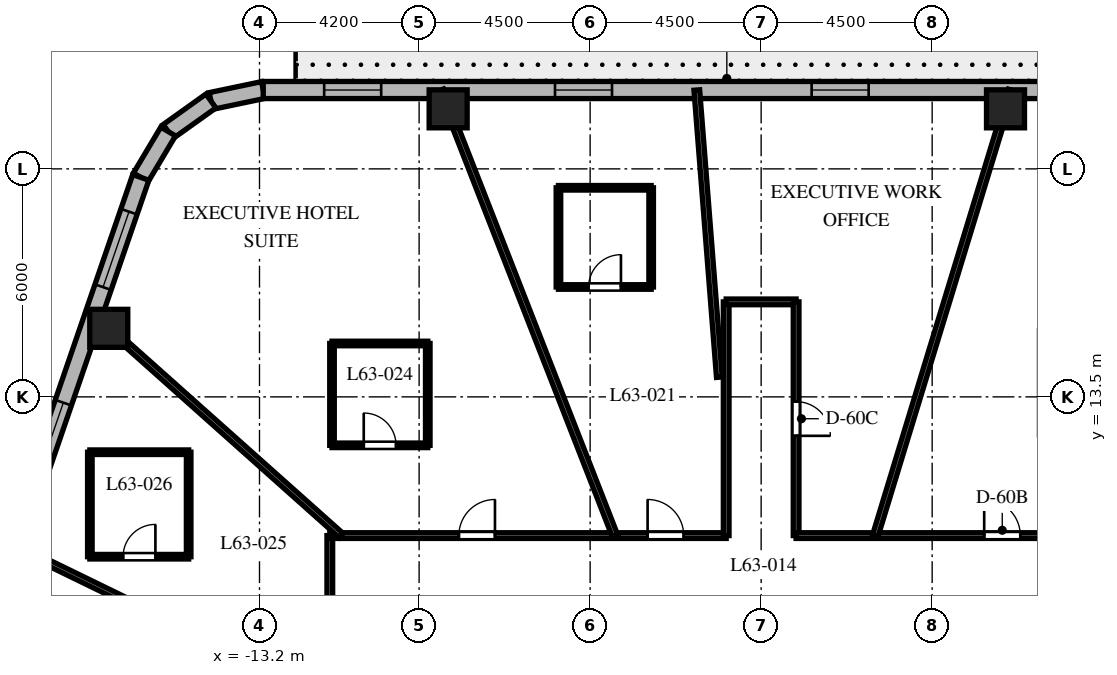
"""IFC4 building model, lengths in metres.
Left out: names, types, materials, properties, quantities, classifications, styles, units other than length and angle.
Written with IfcOpenShell. Run it as: python <this file> out.ifc"""

import sys

from ifc_helpers import new_model, si_unit, direction, frame, frame_2d, origin, origin_2d, place, context, subcontext, project, spatial, rectangle, extrude, element, fill, save


model = new_model("IFC4")
c1 = context("Model", 3, precision=1e-05, world=origin(), true_north=direction((0.0, 1.0)))
c2 = subcontext(c1, "Body", "Model", "MODEL_VIEW")
j1 = project(units=[si_unit("LENGTHUNIT", "METRE"), si_unit("PLANEANGLEUNIT", "RADIAN")], contexts=[c1])
p1 = place(None, origin())
s1 = spatial("IfcSite", under=j1, at=p1, CompositionType="ELEMENT")
p2 = place(p1, origin())
s2 = spatial("IfcBuilding", under=s1, at=p2, CompositionType="ELEMENT")
p3 = place(p2, frame((0.0, 0.0, 252.1)))
s3 = spatial("IfcBuildingStorey", under=s2, at=p3, CompositionType="ELEMENT", Elevation=252.1)
for number, where, z_axis, x_axis in (
    (1, (6.43, 21.08, 0.0), (0.0, 0.0, 1.0), (1.0, 0.0, 0.0)),
    (2, (-8.236, 21.08, 0.0), (0.0, 0.0, 1.0), (1.0, 0.0, 0.0)),
    (3, (-17.166, 15.304, 0.0), (0.0, 0.0, 1.0), (1.0, 0.0, 0.0)),
):
    element("IfcColumn", number, at=place(p3, frame(where, z_axis=z_axis, x_axis=x_axis)), inside=s3, PredefinedType="COLUMN", context=c2, shape_type="SweptSolid", body=[
        extrude(rectangle(XDim=1.0, YDim=1.0, at=origin_2d()), origin(), (0.0, 0.0, 1.0), 3.8),
    ])
p4 = place(p3, frame((-13.102, 21.575, 0.0), z_axis=(0.0, 0.0, 1.0), x_axis=(-0.978757421505, -0.205021730188, 0.0)))
e4 = element("IfcWall", 4, at=p4, inside=s3, PredefinedType="SOLIDWALL", context=c2, shape_type="SweptSolid", body=[
    extrude(rectangle(XDim=1.406, YDim=0.45, at=frame_2d((0.703, 0.0))), origin(), (0.0, 0.0, 1.0), 3.48),
])
p5 = place(p3, frame((-14.478, 21.287, 0.0), z_axis=(0.0, 0.0, 1.0), x_axis=(-0.813888518617, -0.58102106611, 0.0)))
e5 = element("IfcWall", 5, at=p5, inside=s3, PredefinedType="SOLIDWALL", context=c2, shape_type="SweptSolid", body=[
    extrude(rectangle(XDim=1.383, YDim=0.45, at=frame_2d((0.691, 0.0))), origin(), (0.0, 0.0, 1.0), 3.48),
])
p6 = place(p3, frame((-15.604, 20.483, 0.0), z_axis=(0.0, 0.0, 1.0), x_axis=(-0.512222149036, -0.858852996756, 0.0)))
e6 = element("IfcWall", 6, at=p6, inside=s3, PredefinedType="SOLIDWALL", context=c2, shape_type="SweptSolid", body=[
    extrude(rectangle(XDim=1.406, YDim=0.45, at=frame_2d((0.703, 0.0))), origin(), (0.0, 0.0, 1.0), 3.48),
])
p7 = place(p3, frame((11.298, 21.575, 0.0), z_axis=(0.0, 0.0, 1.0), x_axis=(-1.0, 0.0, 0.0)))
e7 = element("IfcWall", 7, at=p7, inside=s3, PredefinedType="SOLIDWALL", context=c2, shape_type="SweptSolid", body=[
    extrude(rectangle(XDim=24.399, YDim=0.45, at=frame_2d((12.2, 0.0))), origin(), (0.0, 0.0, 1.0), 3.48),
])
p8 = place(p7, frame((2.55, 0.0, 0.0)))
e8 = element("IfcOpeningElement", 8, at=p8, cuts=e7, PredefinedType="OPENING", context=c2, shape_type="SweptSolid", body=[
    extrude(rectangle(XDim=0.95, YDim=2.15, at=frame_2d((0.475, 1.075))), frame((0.0, 0.235, 0.0), z_axis=(0.0, -1.0, 0.0), x_axis=(1.0, 0.0, 0.0)), (0.0, 0.0, 1.0), 0.47),
])
p9 = place(p7, frame((8.469, 0.0, 0.8)))
e9 = element("IfcOpeningElement", 9, at=p9, cuts=e7, PredefinedType="OPENING", context=c2, shape_type="SweptSolid", body=[
    extrude(rectangle(XDim=1.5, YDim=1.8, at=frame_2d((0.75, 0.9))), frame((0.0, 0.235, 0.0), z_axis=(0.0, -1.0, 0.0), x_axis=(1.0, 0.0, 0.0)), (0.0, 0.0, 1.0), 0.47),
])
p10 = place(p7, frame((15.222, 0.0, 0.8)))
e10 = element("IfcOpeningElement", 10, at=p10, cuts=e7, PredefinedType="OPENING", context=c2, shape_type="SweptSolid", body=[
    extrude(rectangle(XDim=1.5, YDim=1.8, at=frame_2d((0.75, 0.9))), frame((0.0, 0.235, 0.0), z_axis=(0.0, -1.0, 0.0), x_axis=(1.0, 0.0, 0.0)), (0.0, 0.0, 1.0), 0.47),
])
p11 = place(p7, frame((21.296, 0.0, 0.8)))
e11 = element("IfcOpeningElement", 11, at=p11, cuts=e7, PredefinedType="OPENING", context=c2, shape_type="SweptSolid", body=[
    extrude(rectangle(XDim=1.5, YDim=1.8, at=frame_2d((0.75, 0.9))), frame((0.0, 0.235, 0.0), z_axis=(0.0, -1.0, 0.0), x_axis=(1.0, 0.0, 0.0)), (0.0, 0.0, 1.0), 0.47),
])
p12 = place(p3, frame((-16.324, 19.275, 0.0), z_axis=(0.0, 0.0, 1.0), x_axis=(-0.325083142304, -0.945685439557, 0.0)))
e12 = element("IfcWall", 12, at=p12, inside=s3, PredefinedType="SOLIDWALL", context=c2, shape_type="SweptSolid", body=[
    extrude(rectangle(XDim=20.224, YDim=0.45, at=frame_2d((10.112, 0.0))), origin(), (0.0, 0.0, 1.0), 3.48),
])
p13 = place(p12, frame((0.953, 0.0, 0.8)))
e13 = element("IfcOpeningElement", 13, at=p13, cuts=e12, PredefinedType="OPENING", context=c2, shape_type="SweptSolid", body=[
    extrude(rectangle(XDim=2.1, YDim=1.85, at=frame_2d((1.05, 0.925))), frame((0.0, 0.235, 0.0), z_axis=(0.0, -1.0, 0.0), x_axis=(1.0, 0.0, 0.0)), (0.0, 0.0, 1.0), 0.47),
])
p14 = place(p12, frame((6.268, 0.0, 0.8)))
e14 = element("IfcOpeningElement", 14, at=p14, cuts=e12, PredefinedType="OPENING", context=c2, shape_type="SweptSolid", body=[
    extrude(rectangle(XDim=2.1, YDim=1.85, at=frame_2d((1.05, 0.925))), frame((0.0, 0.235, 0.0), z_axis=(0.0, -1.0, 0.0), x_axis=(1.0, 0.0, 0.0)), (0.0, 0.0, 1.0), 0.47),
])
p15 = place(p12, frame((11.95, 0.0, 0.8)))
e15 = element("IfcOpeningElement", 15, at=p15, cuts=e12, PredefinedType="OPENING", context=c2, shape_type="SweptSolid", body=[
    extrude(rectangle(XDim=2.1, YDim=1.85, at=frame_2d((1.05, 0.925))), frame((0.0, 0.235, 0.0), z_axis=(0.0, -1.0, 0.0), x_axis=(1.0, 0.0, 0.0)), (0.0, 0.0, 1.0), 0.47),
])
p16 = place(p12, frame((17.118, 0.0, 0.8)))
e16 = element("IfcOpeningElement", 16, at=p16, cuts=e12, PredefinedType="OPENING", context=c2, shape_type="SweptSolid", body=[
    extrude(rectangle(XDim=2.1, YDim=1.85, at=frame_2d((1.05, 0.925))), frame((0.0, 0.235, 0.0), z_axis=(0.0, -1.0, 0.0), x_axis=(1.0, 0.0, 0.0)), (0.0, 0.0, 1.0), 0.47),
])
p17 = place(p3, frame((-11.35, 4.4, 0.0), z_axis=(0.0, 0.0, 1.0), x_axis=(0.0, 1.0, 0.0)))
e17 = element("IfcWall", 17, at=p17, inside=s3, PredefinedType="PARTITIONING", context=c2, shape_type="SweptSolid", body=[
    extrude(rectangle(XDim=5.45, YDim=0.15, at=frame_2d((2.725, 0.0))), origin(), (0.0, 0.0, 1.0), 2.97),
])
p18 = place(p17, frame((2.694, 0.0, 0.0)))
e18 = element("IfcOpeningElement", 18, at=p18, cuts=e17, PredefinedType="OPENING", context=c2, shape_type="SweptSolid", body=[
    extrude(rectangle(XDim=0.95, YDim=2.03, at=frame_2d((0.475, 1.015))), frame((0.0, 0.085, 0.0), z_axis=(0.0, -1.0, 0.0), x_axis=(1.0, 0.0, 0.0)), (0.0, 0.0, 1.0), 0.17),
])
p19 = place(p3, frame((-11.35, 9.85, 0.0), z_axis=(0.0, 0.0, 1.0), x_axis=(1.0, 0.0, 0.0)))
e19 = element("IfcWall", 19, at=p19, inside=s3, PredefinedType="PARTITIONING", context=c2, shape_type="SweptSolid", body=[
    extrude(rectangle(XDim=10.43, YDim=0.15, at=frame_2d((5.215, 0.0))), origin(), (0.0, 0.0, 1.0), 2.97),
])
p20 = place(p19, frame((8.362, 0.0, 0.0)))
e20 = element("IfcOpeningElement", 20, at=p20, cuts=e19, PredefinedType="OPENING", context=c2, shape_type="SweptSolid", body=[
    extrude(rectangle(XDim=0.95, YDim=2.03, at=frame_2d((0.475, 1.015))), frame((0.0, 0.085, 0.0), z_axis=(0.0, -1.0, 0.0), x_axis=(1.0, 0.0, 0.0)), (0.0, 0.0, 1.0), 0.17),
])
p21 = place(p19, frame((3.396, 0.0, 0.0)))
e21 = element("IfcOpeningElement", 21, at=p21, cuts=e19, PredefinedType="OPENING", context=c2, shape_type="SweptSolid", body=[
    extrude(rectangle(XDim=0.95, YDim=2.03, at=frame_2d((0.475, 1.015))), frame((0.0, 0.085, 0.0), z_axis=(0.0, -1.0, 0.0), x_axis=(1.0, 0.0, 0.0)), (0.0, 0.0, 1.0), 0.17),
])
p22 = place(p3, frame((-0.92, 9.85, 0.0), z_axis=(0.0, 0.0, 1.0), x_axis=(0.0, 1.0, 0.0)))
e22 = element("IfcWall", 22, at=p22, inside=s3, PredefinedType="PARTITIONING", context=c2, shape_type="SweptSolid", body=[
    extrude(rectangle(XDim=6.15, YDim=0.15, at=frame_2d((3.075, 0.0))), origin(), (0.0, 0.0, 1.0), 3.006),
])
p23 = place(p3, frame((-0.92, 16.0, 0.0), z_axis=(0.0, 0.0, 1.0), x_axis=(1.0, 0.0, 0.0)))
e23 = element("IfcWall", 23, at=p23, inside=s3, PredefinedType="PARTITIONING", context=c2, shape_type="SweptSolid", body=[
    extrude(rectangle(XDim=1.84, YDim=0.15, at=frame_2d((0.92, 0.0))), origin(), (0.0, 0.0, 1.0), 3.48),
])
p24 = place(p3, frame((0.92, 16.0, 0.0), z_axis=(0.0, 0.0, 1.0), x_axis=(0.0, -1.0, 0.0)))
e24 = element("IfcWall", 24, at=p24, inside=s3, PredefinedType="PARTITIONING", context=c2, shape_type="SweptSolid", body=[
    extrude(rectangle(XDim=6.15, YDim=0.15, at=frame_2d((3.075, 0.0))), origin(), (0.0, 0.0, 1.0), 3.006),
])
p25 = place(p24, frame((2.625, 0.0, 0.0)))
e25 = element("IfcOpeningElement", 25, at=p25, cuts=e24, PredefinedType="OPENING", context=c2, shape_type="SweptSolid", body=[
    extrude(rectangle(XDim=0.9, YDim=2.03, at=frame_2d((0.45, 1.015))), frame((0.0, 0.085, 0.0), z_axis=(0.0, -1.0, 0.0), x_axis=(1.0, 0.0, 0.0)), (0.0, 0.0, 1.0), 0.17),
])
p26 = place(p3, frame((0.92, 9.85, 0.0), z_axis=(0.0, 0.0, 1.0), x_axis=(1.0, 0.0, 0.0)))
e26 = element("IfcWall", 26, at=p26, inside=s3, PredefinedType="PARTITIONING", context=c2, shape_type="SweptSolid", body=[
    extrude(rectangle(XDim=10.43, YDim=0.15, at=frame_2d((5.215, 0.0))), origin(), (0.0, 0.0, 1.0), 2.97),
])
p27 = place(p26, frame((4.949, 0.0, 0.0)))
e27 = element("IfcOpeningElement", 27, at=p27, cuts=e26, PredefinedType="OPENING", context=c2, shape_type="SweptSolid", body=[
    extrude(rectangle(XDim=0.95, YDim=2.03, at=frame_2d((0.475, 1.015))), frame((0.0, 0.085, 0.0), z_axis=(0.0, -1.0, 0.0), x_axis=(1.0, 0.0, 0.0)), (0.0, 0.0, 1.0), 0.17),
])
p28 = place(p3, frame((3.004, 9.85, 0.0), z_axis=(0.0, 0.0, 1.0), x_axis=(0.291775760688, 0.956486751333, 0.0)))
e28 = element("IfcWall", 28, at=p28, inside=s3, PredefinedType="PARTITIONING", context=c2, shape_type="SweptSolid", body=[
    extrude(rectangle(XDim=12.258, YDim=0.15, at=frame_2d((6.129, 0.0))), origin(), (0.0, 0.0, 1.0), 2.72),
])
p29 = place(p3, frame((-1.1, 14.018, 0.0), z_axis=(0.0, 0.0, 1.0), x_axis=(-0.078228275349, 0.996935472804, 0.0)))
e29 = element("IfcWall", 29, at=p29, inside=s3, PredefinedType="PARTITIONING", context=c2, shape_type="SweptSolid", body=[
    extrude(rectangle(XDim=7.581, YDim=0.15, at=frame_2d((3.79, 0.0))), origin(), (0.0, 0.0, 1.0), 2.72),
])
p30 = place(p3, frame((-3.848, 9.85, 0.0), z_axis=(0.0, 0.0, 1.0), x_axis=(-0.363921778212, 0.931429513889, 0.0)))
e30 = element("IfcWall", 30, at=p30, inside=s3, PredefinedType="PARTITIONING", context=c2, shape_type="SweptSolid", body=[
    extrude(rectangle(XDim=12.588, YDim=0.15, at=frame_2d((6.294, 0.0))), origin(), (0.0, 0.0, 1.0), 2.72),
])
p31 = place(p3, frame((-11.048, 9.85, 0.0), z_axis=(0.0, 0.0, 1.0), x_axis=(-0.746444434655, 0.665447748492, 0.0)))
e31 = element("IfcWall", 31, at=p31, inside=s3, PredefinedType="PARTITIONING", context=c2, shape_type="SweptSolid", body=[
    extrude(rectangle(XDim=8.732, YDim=0.15, at=frame_2d((4.366, 0.0))), origin(), (0.0, 0.0, 1.0), 2.72),
])
p32 = place(p3, frame((-11.35, 5.528, 0.0), z_axis=(0.0, 0.0, 1.0), x_axis=(-0.899038669565, 0.437869239188, 0.0)))
e32 = element("IfcWall", 32, at=p32, inside=s3, PredefinedType="PARTITIONING", context=c2, shape_type="SweptSolid", body=[
    extrude(rectangle(XDim=9.242, YDim=0.15, at=frame_2d((4.621, 0.0))), origin(), (0.0, 0.0, 1.0), 2.72),
])
p33 = place(p3, frame((-5.334, 16.392, 0.0), z_axis=(0.0, 0.0, 1.0), x_axis=(1.0, 0.0, 0.0)))
e33 = element("IfcWall", 33, at=p33, inside=s3, PredefinedType="PARTITIONING", context=c2, shape_type="SweptSolid", body=[
    extrude(rectangle(XDim=2.44, YDim=0.12, at=frame_2d((1.22, 0.0))), origin(), (0.0, 0.0, 1.0), 3.48),
])
p34 = place(p33, frame((0.795, 0.0, 0.0)))
e34 = element("IfcOpeningElement", 34, at=p34, cuts=e33, PredefinedType="OPENING", context=c2, shape_type="SweptSolid", body=[
    extrude(rectangle(XDim=0.85, YDim=2.03, at=frame_2d((0.425, 1.015))), frame((0.0, 0.07, 0.0), z_axis=(0.0, -1.0, 0.0), x_axis=(1.0, 0.0, 0.0)), (0.0, 0.0, 1.0), 0.14),
])
p35 = place(p3, frame((-2.894, 16.392, 0.0), z_axis=(0.0, 0.0, 1.0), x_axis=(0.0, 1.0, 0.0)))
e35 = element("IfcWall", 35, at=p35, inside=s3, PredefinedType="PARTITIONING", context=c2, shape_type="SweptSolid", body=[
    extrude(rectangle(XDim=2.61, YDim=0.12, at=frame_2d((1.305, 0.0))), origin(), (0.0, 0.0, 1.0), 2.92),
])
p36 = place(p3, frame((-2.894, 19.002, 0.0), z_axis=(0.0, 0.0, 1.0), x_axis=(-1.0, 0.0, 0.0)))
e36 = element("IfcWall", 36, at=p36, inside=s3, PredefinedType="PARTITIONING", context=c2, shape_type="SweptSolid", body=[
    extrude(rectangle(XDim=2.44, YDim=0.12, at=frame_2d((1.22, 0.0))), origin(), (0.0, 0.0, 1.0), 3.48),
])
p37 = place(p3, frame((-5.334, 19.002, 0.0), z_axis=(0.0, 0.0, 1.0), x_axis=(0.0, -1.0, 0.0)))
e37 = element("IfcWall", 37, at=p37, inside=s3, PredefinedType="PARTITIONING", context=c2, shape_type="SweptSolid", body=[
    extrude(rectangle(XDim=2.61, YDim=0.12, at=frame_2d((1.305, 0.0))), origin(), (0.0, 0.0, 1.0), 2.92),
])
p38 = place(p3, frame((-11.292, 12.225, 0.0), z_axis=(0.0, 0.0, 1.0), x_axis=(1.0, 0.0, 0.0)))
e38 = element("IfcWall", 38, at=p38, inside=s3, PredefinedType="PARTITIONING", context=c2, shape_type="SweptSolid", body=[
    extrude(rectangle(XDim=2.52, YDim=0.12, at=frame_2d((1.26, 0.0))), origin(), (0.0, 0.0, 1.0), 2.97),
])
p39 = place(p38, frame((0.835, 0.0, 0.0)))
e39 = element("IfcOpeningElement", 39, at=p39, cuts=e38, PredefinedType="OPENING", context=c2, shape_type="SweptSolid", body=[
    extrude(rectangle(XDim=0.85, YDim=2.03, at=frame_2d((0.425, 1.015))), frame((0.0, 0.07, 0.0), z_axis=(0.0, -1.0, 0.0), x_axis=(1.0, 0.0, 0.0)), (0.0, 0.0, 1.0), 0.14),
])
p40 = place(p3, frame((-8.772, 12.225, 0.0), z_axis=(0.0, 0.0, 1.0), x_axis=(0.0, 1.0, 0.0)))
e40 = element("IfcWall", 40, at=p40, inside=s3, PredefinedType="PARTITIONING", context=c2, shape_type="SweptSolid", body=[
    extrude(rectangle(XDim=2.68, YDim=0.12, at=frame_2d((1.34, 0.0))), origin(), (0.0, 0.0, 1.0), 2.97),
])
p41 = place(p3, frame((-8.772, 14.905, 0.0), z_axis=(0.0, 0.0, 1.0), x_axis=(-1.0, 0.0, 0.0)))
e41 = element("IfcWall", 41, at=p41, inside=s3, PredefinedType="PARTITIONING", context=c2, shape_type="SweptSolid", body=[
    extrude(rectangle(XDim=2.52, YDim=0.12, at=frame_2d((1.26, 0.0))), origin(), (0.0, 0.0, 1.0), 3.006),
])
p42 = place(p3, frame((-11.292, 14.905, 0.0), z_axis=(0.0, 0.0, 1.0), x_axis=(0.0, -1.0, 0.0)))
e42 = element("IfcWall", 42, at=p42, inside=s3, PredefinedType="PARTITIONING", context=c2, shape_type="SweptSolid", body=[
    extrude(rectangle(XDim=2.68, YDim=0.12, at=frame_2d((1.34, 0.0))), origin(), (0.0, 0.0, 1.0), 3.006),
])
p43 = place(p3, frame((-17.664, 9.294, 0.0), z_axis=(0.0, 0.0, 1.0), x_axis=(1.0, 0.0, 0.0)))
e43 = element("IfcWall", 43, at=p43, inside=s3, PredefinedType="PARTITIONING", context=c2, shape_type="SweptSolid", body=[
    extrude(rectangle(XDim=2.6, YDim=0.12, at=frame_2d((1.3, 0.0))), origin(), (0.0, 0.0, 1.0), 3.052),
])
p44 = place(p43, frame((0.875, 0.0, 0.0)))
e44 = element("IfcOpeningElement", 44, at=p44, cuts=e43, PredefinedType="OPENING", context=c2, shape_type="SweptSolid", body=[
    extrude(rectangle(XDim=0.85, YDim=2.03, at=frame_2d((0.425, 1.015))), frame((0.0, 0.07, 0.0), z_axis=(0.0, -1.0, 0.0), x_axis=(1.0, 0.0, 0.0)), (0.0, 0.0, 1.0), 0.14),
])
p45 = place(p3, frame((-15.064, 9.294, 0.0), z_axis=(0.0, 0.0, 1.0), x_axis=(0.0, 1.0, 0.0)))
e45 = element("IfcWall", 45, at=p45, inside=s3, PredefinedType="PARTITIONING", context=c2, shape_type="SweptSolid", body=[
    extrude(rectangle(XDim=2.75, YDim=0.12, at=frame_2d((1.375, 0.0))), origin(), (0.0, 0.0, 1.0), 3.052),
])
p46 = place(p3, frame((-15.064, 12.044, 0.0), z_axis=(0.0, 0.0, 1.0), x_axis=(-1.0, 0.0, 0.0)))
e46 = element("IfcWall", 46, at=p46, inside=s3, PredefinedType="PARTITIONING", context=c2, shape_type="SweptSolid", body=[
    extrude(rectangle(XDim=2.6, YDim=0.12, at=frame_2d((1.3, 0.0))), origin(), (0.0, 0.0, 1.0), 3.48),
])
p47 = place(p3, frame((-17.664, 12.044, 0.0), z_axis=(0.0, 0.0, 1.0), x_axis=(0.0, -1.0, 0.0)))
e47 = element("IfcWall", 47, at=p47, inside=s3, PredefinedType="PARTITIONING", context=c2, shape_type="SweptSolid", body=[
    extrude(rectangle(XDim=2.75, YDim=0.12, at=frame_2d((1.375, 0.0))), origin(), (0.0, 0.0, 1.0), 3.48),
])
p48 = place(p9, origin())
e48 = element("IfcWindow", 48, at=p48, inside=s3, PartitioningType="SINGLE_PANEL", PredefinedType="WINDOW", context=c2, shape_type="SweptSolid", body=[
    extrude(rectangle(XDim=1.5, YDim=1.8, at=frame_2d((0.75, 0.9))), frame((0.0, 0.03, 0.0), z_axis=(0.0, -1.0, 0.0), x_axis=(1.0, 0.0, 0.0)), (0.0, 0.0, 1.0), 0.06),
])
fill(e9, e48)
p49 = place(p10, origin())
e49 = element("IfcWindow", 49, at=p49, inside=s3, PartitioningType="SINGLE_PANEL", PredefinedType="WINDOW", context=c2, shape_type="SweptSolid", body=[
    extrude(rectangle(XDim=1.5, YDim=1.8, at=frame_2d((0.75, 0.9))), frame((0.0, 0.03, 0.0), z_axis=(0.0, -1.0, 0.0), x_axis=(1.0, 0.0, 0.0)), (0.0, 0.0, 1.0), 0.06),
])
fill(e10, e49)
p50 = place(p11, origin())
e50 = element("IfcWindow", 50, at=p50, inside=s3, PartitioningType="SINGLE_PANEL", PredefinedType="WINDOW", context=c2, shape_type="SweptSolid", body=[
    extrude(rectangle(XDim=1.5, YDim=1.8, at=frame_2d((0.75, 0.9))), frame((0.0, 0.03, 0.0), z_axis=(0.0, -1.0, 0.0), x_axis=(1.0, 0.0, 0.0)), (0.0, 0.0, 1.0), 0.06),
])
fill(e11, e50)
p51 = place(p13, origin())
e51 = element("IfcWindow", 51, at=p51, inside=s3, PartitioningType="SINGLE_PANEL", PredefinedType="WINDOW", context=c2, shape_type="SweptSolid", body=[
    extrude(rectangle(XDim=2.1, YDim=1.85, at=frame_2d((1.05, 0.925))), frame((0.0, 0.03, 0.0), z_axis=(0.0, -1.0, 0.0), x_axis=(1.0, 0.0, 0.0)), (0.0, 0.0, 1.0), 0.06),
])
fill(e13, e51)
p52 = place(p14, origin())
e52 = element("IfcWindow", 52, at=p52, inside=s3, PartitioningType="SINGLE_PANEL", PredefinedType="WINDOW", context=c2, shape_type="SweptSolid", body=[
    extrude(rectangle(XDim=2.1, YDim=1.85, at=frame_2d((1.05, 0.925))), frame((0.0, 0.03, 0.0), z_axis=(0.0, -1.0, 0.0), x_axis=(1.0, 0.0, 0.0)), (0.0, 0.0, 1.0), 0.06),
])
fill(e14, e52)
p53 = place(p27, origin())
e53 = element("IfcDoor", 53, at=p53, inside=s3, OperationType="SINGLE_SWING_LEFT", PredefinedType="DOOR", context=c2, shape_type="SweptSolid", body=[
    extrude(rectangle(XDim=0.95, YDim=2.03, at=frame_2d((0.475, 1.015))), frame((0.0, 0.025, 0.0), z_axis=(0.0, -1.0, 0.0), x_axis=(1.0, 0.0, 0.0)), (0.0, 0.0, 1.0), 0.05),
])
fill(e27, e53)
p54 = place(p25, origin())
e54 = element("IfcDoor", 54, at=p54, inside=s3, OperationType="SINGLE_SWING_RIGHT", PredefinedType="DOOR", context=c2, shape_type="SweptSolid", body=[
    extrude(rectangle(XDim=0.9, YDim=2.03, at=frame_2d((0.45, 1.015))), frame((0.0, 0.025, 0.0), z_axis=(0.0, -1.0, 0.0), x_axis=(1.0, 0.0, 0.0)), (0.0, 0.0, 1.0), 0.05),
])
fill(e25, e54)
p55 = place(p20, origin())
e55 = element("IfcDoor", 55, at=p55, inside=s3, OperationType="SINGLE_SWING_LEFT", PredefinedType="DOOR", context=c2, shape_type="SweptSolid", body=[
    extrude(rectangle(XDim=0.95, YDim=2.03, at=frame_2d((0.475, 1.015))), frame((0.0, 0.025, 0.0), z_axis=(0.0, -1.0, 0.0), x_axis=(1.0, 0.0, 0.0)), (0.0, 0.0, 1.0), 0.05),
])
fill(e20, e55)
p56 = place(p34, origin())
e56 = element("IfcDoor", 56, at=p56, inside=s3, OperationType="SINGLE_SWING_RIGHT", PredefinedType="DOOR", context=c2, shape_type="SweptSolid", body=[
    extrude(rectangle(XDim=0.85, YDim=2.03, at=frame_2d((0.425, 1.015))), frame((0.0, 0.025, 0.0), z_axis=(0.0, -1.0, 0.0), x_axis=(1.0, 0.0, 0.0)), (0.0, 0.0, 1.0), 0.05),
])
fill(e34, e56)
p57 = place(p21, origin())
e57 = element("IfcDoor", 57, at=p57, inside=s3, OperationType="SINGLE_SWING_RIGHT", PredefinedType="DOOR", context=c2, shape_type="SweptSolid", body=[
    extrude(rectangle(XDim=0.95, YDim=2.03, at=frame_2d((0.475, 1.015))), frame((0.0, 0.025, 0.0), z_axis=(0.0, -1.0, 0.0), x_axis=(1.0, 0.0, 0.0)), (0.0, 0.0, 1.0), 0.05),
])
fill(e21, e57)
p58 = place(p39, origin())
e58 = element("IfcDoor", 58, at=p58, inside=s3, OperationType="SINGLE_SWING_LEFT", PredefinedType="DOOR", context=c2, shape_type="SweptSolid", body=[
    extrude(rectangle(XDim=0.85, YDim=2.03, at=frame_2d((0.425, 1.015))), frame((0.0, 0.025, 0.0), z_axis=(0.0, -1.0, 0.0), x_axis=(1.0, 0.0, 0.0)), (0.0, 0.0, 1.0), 0.05),
])
fill(e39, e58)
p59 = place(p44, origin())
e59 = element("IfcDoor", 59, at=p59, inside=s3, OperationType="SINGLE_SWING_RIGHT", PredefinedType="DOOR", context=c2, shape_type="SweptSolid", body=[
    extrude(rectangle(XDim=0.85, YDim=2.03, at=frame_2d((0.425, 1.015))), frame((0.0, 0.025, 0.0), z_axis=(0.0, -1.0, 0.0), x_axis=(1.0, 0.0, 0.0)), (0.0, 0.0, 1.0), 0.05),
])
fill(e44, e59)
save(model, sys.argv[1])
